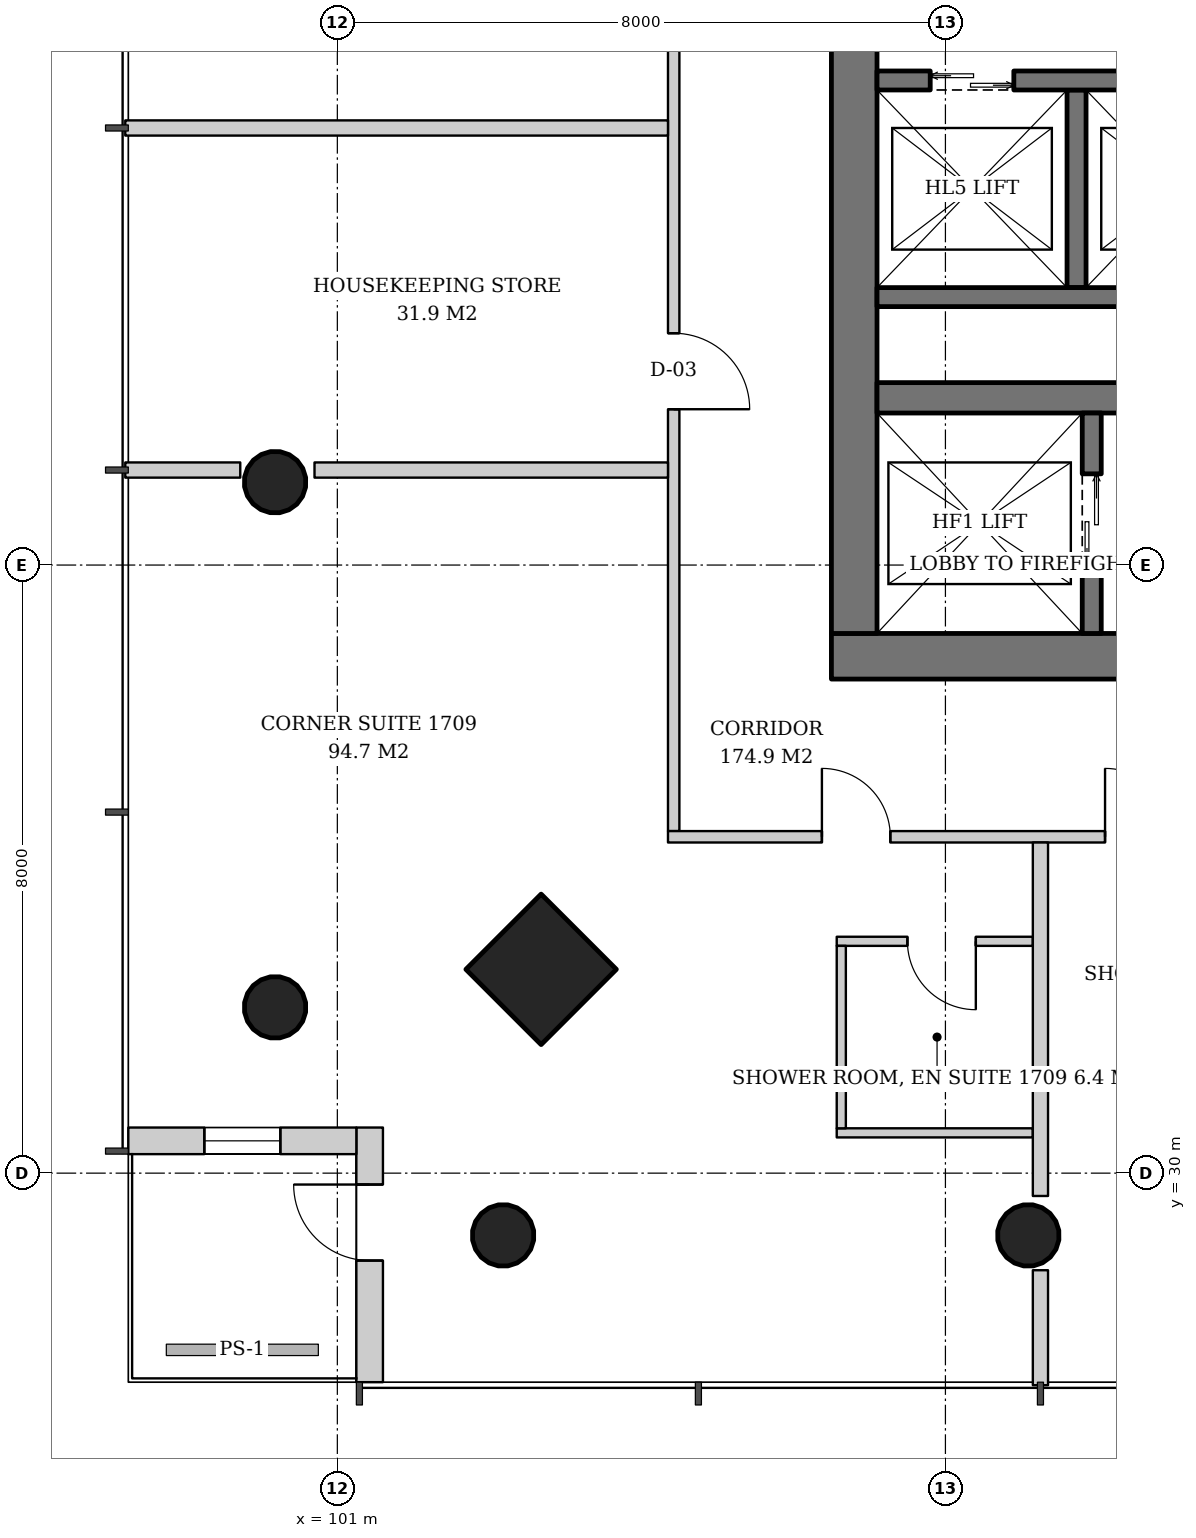
"""IFC4 building model, lengths in metres.
Left out: names, types, materials, properties, quantities, classifications, styles, units other than length and angle.
Written with IfcOpenShell. Run it as: python <this file> out.ifc"""

import sys

from ifc_helpers import new_model, si_unit, direction, frame, frame_2d, origin, origin_2d, place, context, subcontext, project, spatial, rectangle, hollow_circle, extrude, element, fill, save


model = new_model("IFC4")
c1 = context("Model", 3, precision=1e-05, world=origin(), true_north=direction((0.0, 1.0)))
c2 = subcontext(c1, "Body", "Model", "MODEL_VIEW")
j1 = project(units=[si_unit("LENGTHUNIT", "METRE"), si_unit("PLANEANGLEUNIT", "RADIAN")], contexts=[c1])
p1 = place(None, origin())
s1 = spatial("IfcSite", under=j1, at=p1, CompositionType="ELEMENT")
p2 = place(p1, origin())
s2 = spatial("IfcBuilding", under=s1, at=p2, CompositionType="ELEMENT")
p3 = place(p2, frame((0.0, 0.0, 70.4)))
s3 = spatial("IfcBuildingStorey", under=s2, at=p3, CompositionType="ELEMENT", Elevation=70.4)
p4 = place(p3, frame((103.629, 32.629, 0.0), z_axis=(0.043029647111, 0.043029647111, 0.998146732169), x_axis=(-0.707106781187, 0.707106781187, 0.0)))
e1 = element("IfcColumn", 1, at=p4, inside=s3, PredefinedType="COLUMN", context=c2, shape_type="SweptSolid", body=[
    extrude(rectangle(XDim=1.4, YDim=1.4, at=origin_2d()), origin(), (0.0, 0.0, 1.0), 3.807),
])
p5 = place(p3, frame((100.129, 32.129, 0.0), z_axis=(0.043029647111, 0.043029647111, 0.998146732169), x_axis=(-0.707106781187, 0.707106781187, 0.0)))
e2 = element("IfcColumn", 2, at=p5, inside=s3, PredefinedType="COLUMN", context=c2, shape_type="SweptSolid", body=[
    extrude(hollow_circle(Radius=0.406, WallThickness=0.03, at=origin_2d()), origin(), (0.0, 0.0, 1.0), 3.807),
])
p6 = place(p3, frame((100.129, 39.065, 0.0), z_axis=(0.043059584825, 0.021497706284, 0.998841188968), x_axis=(-0.446680166538, 0.894693706707, 0.0)))
e3 = element("IfcColumn", 3, at=p6, inside=s3, PredefinedType="COLUMN", context=c2, shape_type="SweptSolid", body=[
    extrude(hollow_circle(Radius=0.406, WallThickness=0.03, at=origin_2d()), origin(), (0.0, 0.0, 1.0), 3.804),
])
p7 = place(p3, frame((103.129, 29.129, 0.0), z_axis=(0.043029647111, 0.043029647111, 0.998146732169), x_axis=(-0.707106781187, 0.707106781187, 0.0)))
e4 = element("IfcColumn", 4, at=p7, inside=s3, PredefinedType="COLUMN", context=c2, shape_type="SweptSolid", body=[
    extrude(hollow_circle(Radius=0.406, WallThickness=0.03, at=origin_2d()), origin(), (0.0, 0.0, 1.0), 3.807),
])
p8 = place(p3, frame((110.065, 29.129, 0.0), z_axis=(0.021497706284, 0.043059584825, 0.998841188968), x_axis=(-0.894693706707, 0.446680166538, 0.0)))
e5 = element("IfcColumn", 5, at=p8, inside=s3, PredefinedType="COLUMN", context=c2, shape_type="SweptSolid", body=[
    extrude(hollow_circle(Radius=0.406, WallThickness=0.03, at=origin_2d()), origin(), (0.0, 0.0, 1.0), 3.804),
])
p9 = place(p3, frame((107.5, 36.8, 0.0), z_axis=(0.0, 0.0, 1.0), x_axis=(1.0, 0.0, 0.0)))
e6 = element("IfcWall", 6, at=p9, inside=s3, PredefinedType="SHEAR", context=c2, shape_type="SweptSolid", body=[
    extrude(rectangle(XDim=19.0, YDim=0.6, at=frame_2d((9.5, 0.0))), origin(), (0.0, 0.0, 1.0), 3.8),
])
p10 = place(p9, frame((3.9, 0.0, 0.0)))
e7 = element("IfcOpeningElement", 7, at=p10, cuts=e6, PredefinedType="OPENING", context=c2, shape_type="SweptSolid", body=[
    extrude(rectangle(XDim=1.0, YDim=2.1, at=frame_2d((0.5, 1.05))), frame((0.0, 0.31, 0.0), z_axis=(0.0, -1.0, 0.0), x_axis=(1.0, 0.0, 0.0)), (0.0, 0.0, 1.0), 0.62),
])
p11 = place(p9, frame((14.107, 0.0, 0.0)))
e8 = element("IfcOpeningElement", 8, at=p11, cuts=e6, PredefinedType="OPENING", context=c2, shape_type="SweptSolid", body=[
    extrude(rectangle(XDim=1.0, YDim=2.1, at=frame_2d((0.5, 1.05))), frame((0.0, 0.31, 0.0), z_axis=(0.0, -1.0, 0.0), x_axis=(1.0, 0.0, 0.0)), (0.0, 0.0, 1.0), 0.62),
])
p12 = place(p9, frame((15.638, 0.0, 0.0)))
e9 = element("IfcOpeningElement", 9, at=p12, cuts=e6, PredefinedType="OPENING", context=c2, shape_type="SweptSolid", body=[
    extrude(rectangle(XDim=1.0, YDim=2.1, at=frame_2d((0.5, 1.05))), frame((0.0, 0.31, 0.0), z_axis=(0.0, -1.0, 0.0), x_axis=(1.0, 0.0, 0.0)), (0.0, 0.0, 1.0), 0.62),
])
p13 = place(p9, frame((17.142, 0.0, 0.0)))
e10 = element("IfcOpeningElement", 10, at=p13, cuts=e6, PredefinedType="OPENING", context=c2, shape_type="SweptSolid", body=[
    extrude(rectangle(XDim=1.0, YDim=2.1, at=frame_2d((0.5, 1.05))), frame((0.0, 0.31, 0.0), z_axis=(0.0, -1.0, 0.0), x_axis=(1.0, 0.0, 0.0)), (0.0, 0.0, 1.0), 0.62),
])
p14 = place(p3, frame((107.8, 37.1, 0.0), z_axis=(0.0, 0.0, 1.0), x_axis=(0.0, 1.0, 0.0)))
e11 = element("IfcWall", 11, at=p14, inside=s3, PredefinedType="SHEAR", context=c2, shape_type="SweptSolid", body=[
    extrude(rectangle(XDim=17.8, YDim=0.6, at=frame_2d((8.9, 0.0))), origin(), (0.0, 0.0, 1.0), 3.8),
])
p15 = place(p14, frame((8.0, 0.0, 0.0)))
e12 = element("IfcOpeningElement", 12, at=p15, cuts=e11, PredefinedType="OPENING", context=c2, shape_type="SweptSolid", body=[
    extrude(rectangle(XDim=1.8, YDim=2.4, at=frame_2d((0.9, 1.2))), frame((0.0, 0.31, 0.0), z_axis=(0.0, -1.0, 0.0), x_axis=(1.0, 0.0, 0.0)), (0.0, 0.0, 1.0), 0.62),
])
p16 = place(p3, frame((108.1, 40.2, 0.0), z_axis=(0.0, 0.0, 1.0), x_axis=(1.0, 0.0, 0.0)))
e13 = element("IfcWall", 13, at=p16, inside=s3, PredefinedType="SHEAR", context=c2, shape_type="SweptSolid", body=[
    extrude(rectangle(XDim=17.8, YDim=0.4, at=frame_2d((8.9, 0.0))), origin(), (0.0, 0.0, 1.0), 3.8),
])
p17 = place(p3, frame((101.425, 27.25, 0.0), z_axis=(0.0, 0.0, 1.0), x_axis=(0.0, 1.0, 0.0)))
e14 = element("IfcWall", 14, at=p17, inside=s3, PredefinedType="SOLIDWALL", context=c2, shape_type="SweptSolid", body=[
    extrude(rectangle(XDim=3.35, YDim=0.35, at=frame_2d((1.675, 0.0))), origin(), (0.0, 0.0, 1.0), 3.6),
])
p18 = place(p17, frame((1.6, 0.0, 0.0)))
e15 = element("IfcOpeningElement", 15, at=p18, cuts=e14, PredefinedType="OPENING", context=c2, shape_type="SweptSolid", body=[
    extrude(rectangle(XDim=1.0, YDim=2.4, at=frame_2d((0.5, 1.2))), frame((0.0, 0.185, 0.0), z_axis=(0.0, -1.0, 0.0), x_axis=(1.0, 0.0, 0.0)), (0.0, 0.0, 1.0), 0.37),
])
p19 = place(p3, frame((101.25, 30.425, 0.0), z_axis=(0.0, 0.0, 1.0), x_axis=(-1.0, 0.0, 0.0)))
e16 = element("IfcWall", 16, at=p19, inside=s3, PredefinedType="SOLIDWALL", context=c2, shape_type="SweptSolid", body=[
    extrude(rectangle(XDim=3.0, YDim=0.35, at=frame_2d((1.5, 0.0))), origin(), (0.0, 0.0, 1.0), 3.6),
])
p20 = place(p19, frame((1.0, 0.0, 0.9)))
e17 = element("IfcOpeningElement", 17, at=p20, cuts=e16, PredefinedType="OPENING", context=c2, shape_type="SweptSolid", body=[
    extrude(rectangle(XDim=1.0, YDim=2.4, at=frame_2d((0.5, 1.2))), frame((0.0, 0.185, 0.0), z_axis=(0.0, -1.0, 0.0), x_axis=(1.0, 0.0, 0.0)), (0.0, 0.0, 1.0), 0.37),
])
p21 = place(p3, frame((110.925, 37.1, 0.0), z_axis=(0.0, 0.0, 1.0), x_axis=(0.0, 1.0, 0.0)))
e18 = element("IfcWall", 18, at=p21, inside=s3, PredefinedType="SHEAR", context=c2, shape_type="SweptSolid", body=[
    extrude(rectangle(XDim=2.9, YDim=0.25, at=frame_2d((1.45, 0.0))), origin(), (0.0, 0.0, 1.0), 3.8),
])
p22 = place(p21, frame((0.8, 0.0, 0.0)))
e19 = element("IfcOpeningElement", 19, at=p22, cuts=e18, PredefinedType="OPENING", context=c2, shape_type="SweptSolid", body=[
    extrude(rectangle(XDim=1.3, YDim=2.2, at=frame_2d((0.65, 1.1))), frame((0.0, 0.135, 0.0), z_axis=(0.0, -1.0, 0.0), x_axis=(1.0, 0.0, 0.0)), (0.0, 0.0, 1.0), 0.27),
])
p23 = place(p3, frame((110.725, 44.25, 0.0), z_axis=(0.0, 0.0, 1.0), x_axis=(0.0, -1.0, 0.0)))
e20 = element("IfcWall", 20, at=p23, inside=s3, PredefinedType="SHEAR", context=c2, shape_type="SweptSolid", body=[
    extrude(rectangle(XDim=2.6, YDim=0.25, at=frame_2d((1.3, 0.0))), origin(), (0.0, 0.0, 1.0), 3.8),
])
p24 = place(p3, frame((108.1, 41.525, 0.0), z_axis=(0.0, 0.0, 1.0), x_axis=(1.0, 0.0, 0.0)))
e21 = element("IfcWall", 21, at=p24, inside=s3, PredefinedType="SHEAR", context=c2, shape_type="SweptSolid", body=[
    extrude(rectangle(XDim=11.0, YDim=0.25, at=frame_2d((5.5, 0.0))), origin(), (0.0, 0.0, 1.0), 3.8),
])
p25 = place(p3, frame((108.1, 44.375, 0.0), z_axis=(0.0, 0.0, 1.0), x_axis=(1.0, 0.0, 0.0)))
e22 = element("IfcWall", 22, at=p25, inside=s3, PredefinedType="SHEAR", context=c2, shape_type="SweptSolid", body=[
    extrude(rectangle(XDim=12.83, YDim=0.25, at=frame_2d((6.415, 0.0))), origin(), (0.0, 0.0, 1.0), 3.8),
])
p26 = place(p25, frame((0.7, 0.0, 0.0)))
e23 = element("IfcOpeningElement", 23, at=p26, cuts=e22, PredefinedType="OPENING", context=c2, shape_type="SweptSolid", body=[
    extrude(rectangle(XDim=1.1, YDim=2.2, at=frame_2d((0.55, 1.1))), frame((0.0, 0.135, 0.0), z_axis=(0.0, -1.0, 0.0), x_axis=(1.0, 0.0, 0.0)), (0.0, 0.0, 1.0), 0.27),
])
p27 = place(p25, frame((3.45, 0.0, 0.0)))
e24 = element("IfcOpeningElement", 24, at=p27, cuts=e22, PredefinedType="OPENING", context=c2, shape_type="SweptSolid", body=[
    extrude(rectangle(XDim=1.1, YDim=2.2, at=frame_2d((0.55, 1.1))), frame((0.0, 0.135, 0.0), z_axis=(0.0, -1.0, 0.0), x_axis=(1.0, 0.0, 0.0)), (0.0, 0.0, 1.0), 0.27),
])
p28 = place(p25, frame((6.2, 0.0, 0.0)))
e25 = element("IfcOpeningElement", 25, at=p28, cuts=e22, PredefinedType="OPENING", context=c2, shape_type="SweptSolid", body=[
    extrude(rectangle(XDim=1.1, YDim=2.2, at=frame_2d((0.55, 1.1))), frame((0.0, 0.135, 0.0), z_axis=(0.0, -1.0, 0.0), x_axis=(1.0, 0.0, 0.0)), (0.0, 0.0, 1.0), 0.27),
])
p29 = place(p25, frame((9.0, 0.0, 0.0)))
e26 = element("IfcOpeningElement", 26, at=p29, cuts=e22, PredefinedType="OPENING", context=c2, shape_type="SweptSolid", body=[
    extrude(rectangle(XDim=1.0, YDim=2.1, at=frame_2d((0.5, 1.05))), frame((0.0, 0.135, 0.0), z_axis=(0.0, -1.0, 0.0), x_axis=(1.0, 0.0, 0.0)), (0.0, 0.0, 1.0), 0.27),
])
p30 = place(p25, frame((11.515, 0.0, 0.0)))
e27 = element("IfcOpeningElement", 27, at=p30, cuts=e22, PredefinedType="OPENING", context=c2, shape_type="SweptSolid", body=[
    extrude(rectangle(XDim=0.8, YDim=2.0, at=frame_2d((0.4, 1.0))), frame((0.0, 0.135, 0.0), z_axis=(0.0, -1.0, 0.0), x_axis=(1.0, 0.0, 0.0)), (0.0, 0.0, 1.0), 0.27),
])
p31 = place(p3, frame((105.425, 57.65, 0.0), z_axis=(0.0, 0.0, 1.0), x_axis=(0.0, -1.0, 0.0)))
e28 = element("IfcWall", 28, at=p31, inside=s3, PredefinedType="PARTITIONING", context=c2, shape_type="SweptSolid", body=[
    extrude(rectangle(XDim=23.15, YDim=0.15, at=frame_2d((11.575, 0.0))), origin(), (0.0, 0.0, 1.0), 2.8),
])
p32 = place(p31, frame((2.025, 0.0, 0.0)))
e29 = element("IfcOpeningElement", 29, at=p32, cuts=e28, PredefinedType="OPENING", context=c2, shape_type="SweptSolid", body=[
    extrude(rectangle(XDim=0.9, YDim=2.1, at=frame_2d((0.45, 1.05))), frame((0.0, 0.085, 0.0), z_axis=(0.0, -1.0, 0.0), x_axis=(1.0, 0.0, 0.0)), (0.0, 0.0, 1.0), 0.17),
])
p33 = place(p31, frame((7.65, 0.0, 0.0)))
e30 = element("IfcOpeningElement", 30, at=p33, cuts=e28, PredefinedType="OPENING", context=c2, shape_type="SweptSolid", body=[
    extrude(rectangle(XDim=0.9, YDim=2.1, at=frame_2d((0.45, 1.05))), frame((0.0, 0.085, 0.0), z_axis=(0.0, -1.0, 0.0), x_axis=(1.0, 0.0, 0.0)), (0.0, 0.0, 1.0), 0.17),
])
p34 = place(p31, frame((16.6, 0.0, 0.0)))
e31 = element("IfcOpeningElement", 31, at=p34, cuts=e28, PredefinedType="OPENING", context=c2, shape_type="SweptSolid", body=[
    extrude(rectangle(XDim=1.0, YDim=2.1, at=frame_2d((0.5, 1.05))), frame((0.0, 0.085, 0.0), z_axis=(0.0, -1.0, 0.0), x_axis=(1.0, 0.0, 0.0)), (0.0, 0.0, 1.0), 0.17),
])
p35 = place(p3, frame((105.35, 43.75, 0.0), z_axis=(0.0, 0.0, 1.0), x_axis=(-1.0, 0.0, 0.0)))
e32 = element("IfcWall", 32, at=p35, inside=s3, PredefinedType="PARTITIONING", context=c2, shape_type="SweptSolid", body=[
    extrude(rectangle(XDim=7.14, YDim=0.2, at=frame_2d((3.57, 0.0))), origin(), (0.0, 0.0, 1.0), 3.05),
])
p36 = place(p3, frame((105.35, 39.25, 0.0), z_axis=(0.0, 0.0, 1.0), x_axis=(-1.0, 0.0, 0.0)))
e33 = element("IfcWall", 33, at=p36, inside=s3, PredefinedType="PARTITIONING", context=c2, shape_type="SweptSolid", body=[
    extrude(rectangle(XDim=4.65, YDim=0.2, at=frame_2d((2.325, 0.0))), origin(), (0.0, 0.0, 1.0), 3.6),
])
p37 = place(p3, frame((99.723, 39.25, 0.0), z_axis=(0.0, 0.0, 1.0), x_axis=(-1.0, 0.0, 0.0)))
e34 = element("IfcWall", 34, at=p37, inside=s3, PredefinedType="PARTITIONING", context=c2, shape_type="SweptSolid", body=[
    extrude(rectangle(XDim=1.513, YDim=0.2, at=frame_2d((0.756, 0.0))), origin(), (0.0, 0.0, 1.0), 3.6),
])
p38 = place(p3, frame((110.15, 33.05, 0.0), z_axis=(0.0, 0.0, 1.0), x_axis=(-1.0, 0.0, 0.0)))
e35 = element("IfcWall", 35, at=p38, inside=s3, PredefinedType="PARTITIONING", context=c2, shape_type="SweptSolid", body=[
    extrude(rectangle(XDim=2.58, YDim=0.12, at=frame_2d((1.29, 0.0))), origin(), (0.0, 0.0, 1.0), 2.8),
])
p39 = place(p38, frame((0.75, 0.0, 0.0)))
e36 = element("IfcOpeningElement", 36, at=p39, cuts=e35, PredefinedType="OPENING", context=c2, shape_type="SweptSolid", body=[
    extrude(rectangle(XDim=0.9, YDim=2.1, at=frame_2d((0.45, 1.05))), frame((0.0, 0.07, 0.0), z_axis=(0.0, -1.0, 0.0), x_axis=(1.0, 0.0, 0.0)), (0.0, 0.0, 1.0), 0.14),
])
p40 = place(p3, frame((110.15, 30.53, 0.0), z_axis=(0.0, 0.0, 1.0), x_axis=(-1.0, 0.0, 0.0)))
e37 = element("IfcWall", 37, at=p40, inside=s3, PredefinedType="PARTITIONING", context=c2, shape_type="SweptSolid", body=[
    extrude(rectangle(XDim=2.58, YDim=0.12, at=frame_2d((1.29, 0.0))), origin(), (0.0, 0.0, 1.0), 2.8),
])
p41 = place(p3, frame((107.63, 32.99, 0.0), z_axis=(0.0, 0.0, 1.0), x_axis=(0.0, -1.0, 0.0)))
e38 = element("IfcWall", 38, at=p41, inside=s3, PredefinedType="PARTITIONING", context=c2, shape_type="SweptSolid", body=[
    extrude(rectangle(XDim=2.4, YDim=0.12, at=frame_2d((1.2, 0.0))), origin(), (0.0, 0.0, 1.0), 2.8),
])
p42 = place(p3, frame((105.35, 34.425, 0.0), z_axis=(0.0, 0.0, 1.0), x_axis=(1.0, 0.0, 0.0)))
e39 = element("IfcWall", 39, at=p42, inside=s3, PredefinedType="PARTITIONING", context=c2, shape_type="SweptSolid", body=[
    extrude(rectangle(XDim=23.15, YDim=0.15, at=frame_2d((11.575, 0.0))), origin(), (0.0, 0.0, 1.0), 2.8),
])
p43 = place(p42, frame((2.025, 0.0, 0.0)))
e40 = element("IfcOpeningElement", 40, at=p43, cuts=e39, PredefinedType="OPENING", context=c2, shape_type="SweptSolid", body=[
    extrude(rectangle(XDim=0.9, YDim=2.1, at=frame_2d((0.45, 1.05))), frame((0.0, 0.085, 0.0), z_axis=(0.0, -1.0, 0.0), x_axis=(1.0, 0.0, 0.0)), (0.0, 0.0, 1.0), 0.17),
])
p44 = place(p42, frame((5.75, 0.0, 0.0)))
e41 = element("IfcOpeningElement", 41, at=p44, cuts=e39, PredefinedType="OPENING", context=c2, shape_type="SweptSolid", body=[
    extrude(rectangle(XDim=0.9, YDim=2.1, at=frame_2d((0.45, 1.05))), frame((0.0, 0.085, 0.0), z_axis=(0.0, -1.0, 0.0), x_axis=(1.0, 0.0, 0.0)), (0.0, 0.0, 1.0), 0.17),
])
p45 = place(p42, frame((12.15, 0.0, 0.0)))
e42 = element("IfcOpeningElement", 42, at=p45, cuts=e39, PredefinedType="OPENING", context=c2, shape_type="SweptSolid", body=[
    extrude(rectangle(XDim=0.9, YDim=2.1, at=frame_2d((0.45, 1.05))), frame((0.0, 0.085, 0.0), z_axis=(0.0, -1.0, 0.0), x_axis=(1.0, 0.0, 0.0)), (0.0, 0.0, 1.0), 0.17),
])
p46 = place(p3, frame((110.25, 34.35, 0.0), z_axis=(0.0, 0.0, 1.0), x_axis=(0.0, -1.0, 0.0)))
e43 = element("IfcWall", 43, at=p46, inside=s3, PredefinedType="PARTITIONING", context=c2, shape_type="SweptSolid", body=[
    extrude(rectangle(XDim=4.65, YDim=0.2, at=frame_2d((2.325, 0.0))), origin(), (0.0, 0.0, 1.0), 3.6),
])
p47 = place(p3, frame((110.25, 28.723, 0.0), z_axis=(0.0, 0.0, 1.0), x_axis=(0.0, -1.0, 0.0)))
e44 = element("IfcWall", 44, at=p47, inside=s3, PredefinedType="PARTITIONING", context=c2, shape_type="SweptSolid", body=[
    extrude(rectangle(XDim=1.513, YDim=0.2, at=frame_2d((0.756, 0.0))), origin(), (0.0, 0.0, 1.0), 3.6),
])
p48 = place(p18, origin())
e45 = element("IfcDoor", 45, at=p48, inside=s3, OperationType="SINGLE_SWING_RIGHT", PredefinedType="DOOR", context=c2, shape_type="SweptSolid", body=[
    extrude(rectangle(XDim=1.0, YDim=2.4, at=frame_2d((0.5, 1.2))), frame((0.0, 0.025, 0.0), z_axis=(0.0, -1.0, 0.0), x_axis=(1.0, 0.0, 0.0)), (0.0, 0.0, 1.0), 0.05),
])
fill(e15, e45)
p49 = place(p20, origin())
e46 = element("IfcWindow", 46, at=p49, inside=s3, PartitioningType="SINGLE_PANEL", PredefinedType="WINDOW", context=c2, shape_type="SweptSolid", body=[
    extrude(rectangle(XDim=1.0, YDim=2.4, at=frame_2d((0.5, 1.2))), frame((0.0, 0.03, 0.0), z_axis=(0.0, -1.0, 0.0), x_axis=(1.0, 0.0, 0.0)), (0.0, 0.0, 1.0), 0.06),
])
fill(e17, e46)
p50 = place(p22, origin())
e47 = element("IfcDoor", 47, at=p50, inside=s3, OperationType="DOUBLE_DOOR_SLIDING", PredefinedType="DOOR", context=c2, shape_type="SweptSolid", body=[
    extrude(rectangle(XDim=1.3, YDim=2.2, at=frame_2d((0.65, 1.1))), frame((0.0, 0.025, 0.0), z_axis=(0.0, -1.0, 0.0), x_axis=(1.0, 0.0, 0.0)), (0.0, 0.0, 1.0), 0.05),
])
fill(e19, e47)
p51 = place(p26, origin())
e48 = element("IfcDoor", 48, at=p51, inside=s3, OperationType="DOUBLE_DOOR_SLIDING", PredefinedType="DOOR", context=c2, shape_type="SweptSolid", body=[
    extrude(rectangle(XDim=1.1, YDim=2.2, at=frame_2d((0.55, 1.1))), frame((0.0, 0.025, 0.0), z_axis=(0.0, -1.0, 0.0), x_axis=(1.0, 0.0, 0.0)), (0.0, 0.0, 1.0), 0.05),
])
fill(e23, e48)
p52 = place(p34, origin())
e49 = element("IfcDoor", 49, at=p52, inside=s3, OperationType="SINGLE_SWING_RIGHT", PredefinedType="DOOR", context=c2, shape_type="SweptSolid", body=[
    extrude(rectangle(XDim=1.0, YDim=2.1, at=frame_2d((0.5, 1.05))), frame((0.0, 0.025, 0.0), z_axis=(0.0, -1.0, 0.0), x_axis=(1.0, 0.0, 0.0)), (0.0, 0.0, 1.0), 0.05),
])
fill(e31, e49)
p53 = place(p39, origin())
e50 = element("IfcDoor", 50, at=p53, inside=s3, OperationType="SINGLE_SWING_LEFT", PredefinedType="DOOR", context=c2, shape_type="SweptSolid", body=[
    extrude(rectangle(XDim=0.9, YDim=2.1, at=frame_2d((0.45, 1.05))), frame((0.0, 0.025, 0.0), z_axis=(0.0, -1.0, 0.0), x_axis=(1.0, 0.0, 0.0)), (0.0, 0.0, 1.0), 0.05),
])
fill(e36, e50)
p54 = place(p43, origin())
e51 = element("IfcDoor", 51, at=p54, inside=s3, OperationType="SINGLE_SWING_LEFT", PredefinedType="DOOR", context=c2, shape_type="SweptSolid", body=[
    extrude(rectangle(XDim=0.9, YDim=2.1, at=frame_2d((0.45, 1.05))), frame((0.0, 0.025, 0.0), z_axis=(0.0, -1.0, 0.0), x_axis=(1.0, 0.0, 0.0)), (0.0, 0.0, 1.0), 0.05),
])
fill(e40, e51)
p55 = place(p44, origin())
e52 = element("IfcDoor", 52, at=p55, inside=s3, OperationType="SINGLE_SWING_LEFT", PredefinedType="DOOR", context=c2, shape_type="SweptSolid", body=[
    extrude(rectangle(XDim=0.9, YDim=2.1, at=frame_2d((0.45, 1.05))), frame((0.0, 0.025, 0.0), z_axis=(0.0, -1.0, 0.0), x_axis=(1.0, 0.0, 0.0)), (0.0, 0.0, 1.0), 0.05),
])
fill(e41, e52)
save(model, sys.argv[1])
